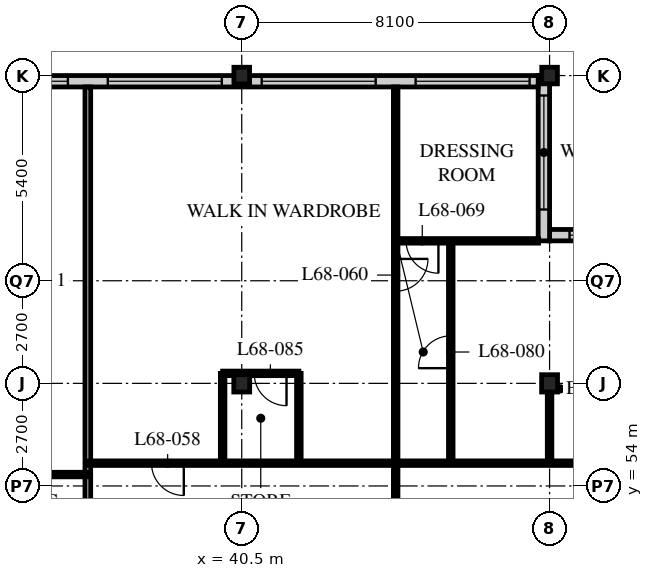
"""IFC4 building model, lengths in metres.
Left out: names, types, materials, properties, quantities, classifications, styles, units other than length and angle.
Written with IfcOpenShell. Run it as: python <this file> out.ifc"""

import sys

from ifc_helpers import new_model, si_unit, direction, frame, frame_2d, origin, origin_2d, place, context, subcontext, project, spatial, rectangle, i_section, extrude, element, fill, save


model = new_model("IFC4")
c1 = context("Model", 3, precision=1e-05, world=origin(), true_north=direction((0.0, 1.0)))
c2 = subcontext(c1, "Body", "Model", "MODEL_VIEW")
j1 = project(units=[si_unit("LENGTHUNIT", "METRE"), si_unit("PLANEANGLEUNIT", "RADIAN")], contexts=[c1])
p1 = place(None, origin())
s1 = spatial("IfcSite", under=j1, at=p1, CompositionType="ELEMENT")
p2 = place(p1, origin())
s2 = spatial("IfcBuilding", under=s1, at=p2, CompositionType="ELEMENT")
p3 = place(p2, frame((0.0, 0.0, 265.8)))
s3 = spatial("IfcBuildingStorey", under=s2, at=p3, CompositionType="ELEMENT", Elevation=265.8)
p4 = place(p3, frame((40.5, 56.7, 0.0), z_axis=(0.0, 0.0, 1.0), x_axis=(1.0, 0.0, 0.0)))
e1 = element("IfcColumn", 1, at=p4, inside=s3, PredefinedType="COLUMN", context=c2, shape_type="SweptSolid", body=[
    extrude(i_section(OverallWidth=0.418, OverallDepth=0.456, WebThickness=0.042, FlangeThickness=0.067, FilletRadius=0.015, at=origin_2d()), origin(), (0.0, 0.0, 1.0), 3.9),
])
p5 = place(p3, frame((40.5, 64.8, 0.0), z_axis=(0.0, 0.0, 1.0), x_axis=(1.0, 0.0, 0.0)))
e2 = element("IfcColumn", 2, at=p5, inside=s3, PredefinedType="COLUMN", context=c2, shape_type="SweptSolid", body=[
    extrude(i_section(OverallWidth=0.412, OverallDepth=0.437, WebThickness=0.036, FlangeThickness=0.058, FilletRadius=0.015, at=origin_2d()), origin(), (0.0, 0.0, 1.0), 3.9),
])
p6 = place(p3, frame((48.6, 56.7, 0.0), z_axis=(0.0, 0.0, 1.0), x_axis=(1.0, 0.0, 0.0)))
e3 = element("IfcColumn", 3, at=p6, inside=s3, PredefinedType="COLUMN", context=c2, shape_type="SweptSolid", body=[
    extrude(i_section(OverallWidth=0.418, OverallDepth=0.456, WebThickness=0.042, FlangeThickness=0.067, FilletRadius=0.015, at=origin_2d()), origin(), (0.0, 0.0, 1.0), 3.9),
])
p7 = place(p3, frame((48.6, 64.8, 0.0), z_axis=(0.0, 0.0, 1.0), x_axis=(1.0, 0.0, 0.0)))
e4 = element("IfcColumn", 4, at=p7, inside=s3, PredefinedType="COLUMN", context=c2, shape_type="SweptSolid", body=[
    extrude(i_section(OverallWidth=0.412, OverallDepth=0.437, WebThickness=0.036, FlangeThickness=0.058, FilletRadius=0.015, at=origin_2d()), origin(), (0.0, 0.0, 1.0), 3.9),
])
p8 = place(p3, frame((52.35, 60.6, 0.0), z_axis=(0.0, 0.0, 1.0), x_axis=(-1.0, 0.0, 0.0)))
e5 = element("IfcWall", 5, at=p8, inside=s3, PredefinedType="SOLIDWALL", context=c2, shape_type="SweptSolid", body=[
    extrude(rectangle(XDim=3.75, YDim=0.3, at=frame_2d((1.875, 0.0))), origin(), (0.0, 0.0, 1.0), 3.69),
])
p9 = place(p8, frame((0.225, 0.0, 0.6)))
e6 = element("IfcOpeningElement", 6, at=p9, cuts=e5, PredefinedType="OPENING", context=c2, shape_type="SweptSolid", body=[
    extrude(rectangle(XDim=3.0, YDim=2.3, at=frame_2d((1.5, 1.15))), frame((0.0, 0.16, 0.0), z_axis=(0.0, -1.0, 0.0), x_axis=(1.0, 0.0, 0.0)), (0.0, 0.0, 1.0), 0.32),
])
p10 = place(p3, frame((48.45, 60.45, 0.0), z_axis=(0.0, 0.0, 1.0), x_axis=(0.0, 1.0, 0.0)))
e7 = element("IfcWall", 7, at=p10, inside=s3, PredefinedType="SOLIDWALL", context=c2, shape_type="SweptSolid", body=[
    extrude(rectangle(XDim=4.35, YDim=0.3, at=frame_2d((2.175, 0.0))), origin(), (0.0, 0.0, 1.0), 3.69),
])
p11 = place(p10, frame((0.825, 0.0, 0.6)))
e8 = element("IfcOpeningElement", 8, at=p11, cuts=e7, PredefinedType="OPENING", context=c2, shape_type="SweptSolid", body=[
    extrude(rectangle(XDim=3.0, YDim=2.3, at=frame_2d((1.5, 1.15))), frame((0.0, 0.16, 0.0), z_axis=(0.0, -1.0, 0.0), x_axis=(1.0, 0.0, 0.0)), (0.0, 0.0, 1.0), 0.32),
])
p12 = place(p3, frame((48.3, 64.65, 0.0), z_axis=(0.0, 0.0, 1.0), x_axis=(-1.0, 0.0, 0.0)))
e9 = element("IfcWall", 9, at=p12, inside=s3, PredefinedType="SOLIDWALL", context=c2, shape_type="SweptSolid", body=[
    extrude(rectangle(XDim=40.2, YDim=0.3, at=frame_2d((20.1, 0.0))), origin(), (0.0, 0.0, 1.0), 3.69),
])
p13 = place(p12, frame((0.225, 0.0, 0.6)))
e10 = element("IfcOpeningElement", 10, at=p13, cuts=e9, PredefinedType="OPENING", context=c2, shape_type="SweptSolid", body=[
    extrude(rectangle(XDim=3.0, YDim=2.4, at=frame_2d((1.5, 1.2))), frame((0.0, 0.16, 0.0), z_axis=(0.0, -1.0, 0.0), x_axis=(1.0, 0.0, 0.0)), (0.0, 0.0, 1.0), 0.32),
])
p14 = place(p12, frame((4.275, 0.0, 0.6)))
e11 = element("IfcOpeningElement", 11, at=p14, cuts=e9, PredefinedType="OPENING", context=c2, shape_type="SweptSolid", body=[
    extrude(rectangle(XDim=3.0, YDim=2.4, at=frame_2d((1.5, 1.2))), frame((0.0, 0.16, 0.0), z_axis=(0.0, -1.0, 0.0), x_axis=(1.0, 0.0, 0.0)), (0.0, 0.0, 1.0), 0.32),
])
p15 = place(p12, frame((8.325, 0.0, 0.6)))
e12 = element("IfcOpeningElement", 12, at=p15, cuts=e9, PredefinedType="OPENING", context=c2, shape_type="SweptSolid", body=[
    extrude(rectangle(XDim=3.0, YDim=2.4, at=frame_2d((1.5, 1.2))), frame((0.0, 0.16, 0.0), z_axis=(0.0, -1.0, 0.0), x_axis=(1.0, 0.0, 0.0)), (0.0, 0.0, 1.0), 0.32),
])
p16 = place(p12, frame((12.375, 0.0, 0.6)))
e13 = element("IfcOpeningElement", 13, at=p16, cuts=e9, PredefinedType="OPENING", context=c2, shape_type="SweptSolid", body=[
    extrude(rectangle(XDim=3.0, YDim=2.4, at=frame_2d((1.5, 1.2))), frame((0.0, 0.16, 0.0), z_axis=(0.0, -1.0, 0.0), x_axis=(1.0, 0.0, 0.0)), (0.0, 0.0, 1.0), 0.32),
])
p17 = place(p12, frame((16.425, 0.0, 0.6)))
e14 = element("IfcOpeningElement", 14, at=p17, cuts=e9, PredefinedType="OPENING", context=c2, shape_type="SweptSolid", body=[
    extrude(rectangle(XDim=3.0, YDim=2.4, at=frame_2d((1.5, 1.2))), frame((0.0, 0.16, 0.0), z_axis=(0.0, -1.0, 0.0), x_axis=(1.0, 0.0, 0.0)), (0.0, 0.0, 1.0), 0.32),
])
p18 = place(p12, frame((20.475, 0.0, 0.6)))
e15 = element("IfcOpeningElement", 15, at=p18, cuts=e9, PredefinedType="OPENING", context=c2, shape_type="SweptSolid", body=[
    extrude(rectangle(XDim=3.0, YDim=2.4, at=frame_2d((1.5, 1.2))), frame((0.0, 0.16, 0.0), z_axis=(0.0, -1.0, 0.0), x_axis=(1.0, 0.0, 0.0)), (0.0, 0.0, 1.0), 0.32),
])
p19 = place(p12, frame((24.525, 0.0, 0.6)))
e16 = element("IfcOpeningElement", 16, at=p19, cuts=e9, PredefinedType="OPENING", context=c2, shape_type="SweptSolid", body=[
    extrude(rectangle(XDim=3.0, YDim=2.4, at=frame_2d((1.5, 1.2))), frame((0.0, 0.16, 0.0), z_axis=(0.0, -1.0, 0.0), x_axis=(1.0, 0.0, 0.0)), (0.0, 0.0, 1.0), 0.32),
])
p20 = place(p12, frame((28.575, 0.0, 0.6)))
e17 = element("IfcOpeningElement", 17, at=p20, cuts=e9, PredefinedType="OPENING", context=c2, shape_type="SweptSolid", body=[
    extrude(rectangle(XDim=3.0, YDim=2.4, at=frame_2d((1.5, 1.2))), frame((0.0, 0.16, 0.0), z_axis=(0.0, -1.0, 0.0), x_axis=(1.0, 0.0, 0.0)), (0.0, 0.0, 1.0), 0.32),
])
p21 = place(p12, frame((32.625, 0.0, 0.6)))
e18 = element("IfcOpeningElement", 18, at=p21, cuts=e9, PredefinedType="OPENING", context=c2, shape_type="SweptSolid", body=[
    extrude(rectangle(XDim=3.0, YDim=2.4, at=frame_2d((1.5, 1.2))), frame((0.0, 0.16, 0.0), z_axis=(0.0, -1.0, 0.0), x_axis=(1.0, 0.0, 0.0)), (0.0, 0.0, 1.0), 0.32),
])
p22 = place(p12, frame((36.675, 0.0, 0.6)))
e19 = element("IfcOpeningElement", 19, at=p22, cuts=e9, PredefinedType="OPENING", context=c2, shape_type="SweptSolid", body=[
    extrude(rectangle(XDim=3.0, YDim=2.4, at=frame_2d((1.5, 1.2))), frame((0.0, 0.16, 0.0), z_axis=(0.0, -1.0, 0.0), x_axis=(1.0, 0.0, 0.0)), (0.0, 0.0, 1.0), 0.32),
])
p23 = place(p3, frame((36.45, 64.5, 0.0), z_axis=(0.0, 0.0, 1.0), x_axis=(0.0, -1.0, 0.0)))
e20 = element("IfcWall", 20, at=p23, inside=s3, PredefinedType="PARTITIONING", context=c2, shape_type="SweptSolid", body=[
    extrude(rectangle(XDim=15.9, YDim=0.15, at=frame_2d((7.95, 0.0))), origin(), (0.0, 0.0, 1.0), 3.69),
])
p24 = place(p3, frame((36.45, 54.6, 0.0), z_axis=(0.0, 0.0, 1.0), x_axis=(1.0, 0.0, 0.0)))
e21 = element("IfcWall", 21, at=p24, inside=s3, PredefinedType="PARTITIONING", context=c2, shape_type="SweptSolid", body=[
    extrude(rectangle(XDim=19.95, YDim=0.12, at=frame_2d((9.975, 0.0))), origin(), (0.0, 0.0, 1.0), 3.69),
])
p25 = place(p24, frame((1.675, 0.0, 0.0)))
e22 = element("IfcOpeningElement", 22, at=p25, cuts=e21, PredefinedType="OPENING", context=c2, shape_type="SweptSolid", body=[
    extrude(rectangle(XDim=0.85, YDim=2.1, at=frame_2d((0.425, 1.05))), frame((0.0, 0.07, 0.0), z_axis=(0.0, -1.0, 0.0), x_axis=(1.0, 0.0, 0.0)), (0.0, 0.0, 1.0), 0.14),
])
p26 = place(p3, frame((44.55, 64.5, 0.0), z_axis=(0.0, 0.0, 1.0), x_axis=(0.0, -1.0, 0.0)))
e23 = element("IfcWall", 23, at=p26, inside=s3, PredefinedType="PARTITIONING", context=c2, shape_type="SweptSolid", body=[
    extrude(rectangle(XDim=17.7, YDim=0.12, at=frame_2d((8.85, 0.0))), origin(), (0.0, 0.0, 1.0), 3.69),
])
p27 = place(p26, frame((12.475, 0.0, 0.0)))
e24 = element("IfcOpeningElement", 24, at=p27, cuts=e23, PredefinedType="OPENING", context=c2, shape_type="SweptSolid", body=[
    extrude(rectangle(XDim=0.85, YDim=2.1, at=frame_2d((0.425, 1.05))), frame((0.0, 0.07, 0.0), z_axis=(0.0, -1.0, 0.0), x_axis=(1.0, 0.0, 0.0)), (0.0, 0.0, 1.0), 0.14),
])
p28 = place(p26, frame((4.525, 0.0, 0.0)))
e25 = element("IfcOpeningElement", 25, at=p28, cuts=e23, PredefinedType="OPENING", context=c2, shape_type="SweptSolid", body=[
    extrude(rectangle(XDim=0.85, YDim=2.1, at=frame_2d((0.425, 1.05))), frame((0.0, 0.07, 0.0), z_axis=(0.0, -1.0, 0.0), x_axis=(1.0, 0.0, 0.0)), (0.0, 0.0, 1.0), 0.14),
])
p29 = place(p3, frame((48.31, 60.45, 0.0), z_axis=(0.0, 0.0, 1.0), x_axis=(-1.0, 0.0, 0.0)))
e26 = element("IfcWall", 26, at=p29, inside=s3, PredefinedType="PARTITIONING", context=c2, shape_type="SweptSolid", body=[
    extrude(rectangle(XDim=3.76, YDim=0.12, at=frame_2d((1.88, 0.0))), origin(), (0.0, 0.0, 1.0), 3.69),
])
p30 = place(p29, frame((2.635, 0.0, 0.0)))
e27 = element("IfcOpeningElement", 27, at=p30, cuts=e26, PredefinedType="OPENING", context=c2, shape_type="SweptSolid", body=[
    extrude(rectangle(XDim=0.85, YDim=2.1, at=frame_2d((0.425, 1.05))), frame((0.0, 0.07, 0.0), z_axis=(0.0, -1.0, 0.0), x_axis=(1.0, 0.0, 0.0)), (0.0, 0.0, 1.0), 0.14),
])
p31 = place(p3, frame((32.4, 54.3, 0.0), z_axis=(0.0, 0.0, 1.0), x_axis=(1.0, 0.0, 0.0)))
e28 = element("IfcWall", 28, at=p31, inside=s3, PredefinedType="PARTITIONING", context=c2, shape_type="SweptSolid", body=[
    extrude(rectangle(XDim=4.05, YDim=0.12, at=frame_2d((2.025, 0.0))), origin(), (0.0, 0.0, 1.0), 3.69),
])
p32 = place(p31, frame((1.6, 0.0, 0.0)))
e29 = element("IfcOpeningElement", 29, at=p32, cuts=e28, PredefinedType="OPENING", context=c2, shape_type="SweptSolid", body=[
    extrude(rectangle(XDim=0.85, YDim=2.1, at=frame_2d((0.425, 1.05))), frame((0.0, 0.07, 0.0), z_axis=(0.0, -1.0, 0.0), x_axis=(1.0, 0.0, 0.0)), (0.0, 0.0, 1.0), 0.14),
])
p33 = place(p3, frame((46.0, 54.6, 0.0), z_axis=(0.0, 0.0, 1.0), x_axis=(0.0, 1.0, 0.0)))
e30 = element("IfcWall", 30, at=p33, inside=s3, PredefinedType="PARTITIONING", context=c2, shape_type="SweptSolid", body=[
    extrude(rectangle(XDim=5.85, YDim=0.12, at=frame_2d((2.925, 0.0))), origin(), (0.0, 0.0, 1.0), 3.69),
])
p34 = place(p33, frame((2.5, 0.0, 0.0)))
e31 = element("IfcOpeningElement", 31, at=p34, cuts=e30, PredefinedType="OPENING", context=c2, shape_type="SweptSolid", body=[
    extrude(rectangle(XDim=0.85, YDim=2.1, at=frame_2d((0.425, 1.05))), frame((0.0, 0.07, 0.0), z_axis=(0.0, -1.0, 0.0), x_axis=(1.0, 0.0, 0.0)), (0.0, 0.0, 1.0), 0.14),
])
for number, where, z_axis, x_axis in (
    (32, (39.997, 54.6, 0.0), (0.0, 0.0, 1.0), (0.0, 1.0, 0.0)),
    (33, (42.003, 54.6, 0.0), (0.0, 0.0, 1.0), (0.0, 1.0, 0.0)),
):
    element("IfcWall", number, at=place(p3, frame(where, z_axis=z_axis, x_axis=x_axis)), inside=s3, PredefinedType="PARTITIONING", context=c2, shape_type="SweptSolid", body=[
        extrude(rectangle(XDim=2.363, YDim=0.12, at=frame_2d((1.181, 0.0))), origin(), (0.0, 0.0, 1.0), 3.69),
    ])
p35 = place(p3, frame((39.997, 56.963, 0.0), z_axis=(0.0, 0.0, 1.0), x_axis=(1.0, 0.0, 0.0)))
e34 = element("IfcWall", 34, at=p35, inside=s3, PredefinedType="PARTITIONING", context=c2, shape_type="SweptSolid", body=[
    extrude(rectangle(XDim=2.006, YDim=0.12, at=frame_2d((1.003, 0.0))), origin(), (0.0, 0.0, 1.0), 3.69),
])
p36 = place(p35, frame((0.831, 0.0, 0.0)))
e35 = element("IfcOpeningElement", 35, at=p36, cuts=e34, PredefinedType="OPENING", context=c2, shape_type="SweptSolid", body=[
    extrude(rectangle(XDim=0.85, YDim=2.1, at=frame_2d((0.425, 1.05))), frame((0.0, 0.07, 0.0), z_axis=(0.0, -1.0, 0.0), x_axis=(1.0, 0.0, 0.0)), (0.0, 0.0, 1.0), 0.14),
])
p37 = place(p3, frame((48.6, 54.6, 0.0), z_axis=(0.0, 0.0, 1.0), x_axis=(0.0, 1.0, 0.0)))
e36 = element("IfcWall", 36, at=p37, inside=s3, PredefinedType="PARTITIONING", context=c2, shape_type="SweptSolid", body=[
    extrude(rectangle(XDim=1.897, YDim=0.12, at=frame_2d((0.948, 0.0))), origin(), (0.0, 0.0, 1.0), 3.078),
])
p38 = place(p9, origin())
e37 = element("IfcWindow", 37, at=p38, inside=s3, PartitioningType="SINGLE_PANEL", PredefinedType="WINDOW", context=c2, shape_type="SweptSolid", body=[
    extrude(rectangle(XDim=3.0, YDim=2.3, at=frame_2d((1.5, 1.15))), frame((0.0, 0.03, 0.0), z_axis=(0.0, -1.0, 0.0), x_axis=(1.0, 0.0, 0.0)), (0.0, 0.0, 1.0), 0.06),
])
fill(e6, e37)
p39 = place(p11, origin())
e38 = element("IfcWindow", 38, at=p39, inside=s3, PartitioningType="SINGLE_PANEL", PredefinedType="WINDOW", context=c2, shape_type="SweptSolid", body=[
    extrude(rectangle(XDim=3.0, YDim=2.3, at=frame_2d((1.5, 1.15))), frame((0.0, 0.03, 0.0), z_axis=(0.0, -1.0, 0.0), x_axis=(1.0, 0.0, 0.0)), (0.0, 0.0, 1.0), 0.06),
])
fill(e8, e38)
p40 = place(p13, origin())
e39 = element("IfcWindow", 39, at=p40, inside=s3, PartitioningType="SINGLE_PANEL", PredefinedType="WINDOW", context=c2, shape_type="SweptSolid", body=[
    extrude(rectangle(XDim=3.0, YDim=2.4, at=frame_2d((1.5, 1.2))), frame((0.0, 0.03, 0.0), z_axis=(0.0, -1.0, 0.0), x_axis=(1.0, 0.0, 0.0)), (0.0, 0.0, 1.0), 0.06),
])
fill(e10, e39)
p41 = place(p14, origin())
e40 = element("IfcWindow", 40, at=p41, inside=s3, PartitioningType="SINGLE_PANEL", PredefinedType="WINDOW", context=c2, shape_type="SweptSolid", body=[
    extrude(rectangle(XDim=3.0, YDim=2.4, at=frame_2d((1.5, 1.2))), frame((0.0, 0.03, 0.0), z_axis=(0.0, -1.0, 0.0), x_axis=(1.0, 0.0, 0.0)), (0.0, 0.0, 1.0), 0.06),
])
fill(e11, e40)
p42 = place(p15, origin())
e41 = element("IfcWindow", 41, at=p42, inside=s3, PartitioningType="SINGLE_PANEL", PredefinedType="WINDOW", context=c2, shape_type="SweptSolid", body=[
    extrude(rectangle(XDim=3.0, YDim=2.4, at=frame_2d((1.5, 1.2))), frame((0.0, 0.03, 0.0), z_axis=(0.0, -1.0, 0.0), x_axis=(1.0, 0.0, 0.0)), (0.0, 0.0, 1.0), 0.06),
])
fill(e12, e41)
p43 = place(p16, origin())
e42 = element("IfcWindow", 42, at=p43, inside=s3, PartitioningType="SINGLE_PANEL", PredefinedType="WINDOW", context=c2, shape_type="SweptSolid", body=[
    extrude(rectangle(XDim=3.0, YDim=2.4, at=frame_2d((1.5, 1.2))), frame((0.0, 0.03, 0.0), z_axis=(0.0, -1.0, 0.0), x_axis=(1.0, 0.0, 0.0)), (0.0, 0.0, 1.0), 0.06),
])
fill(e13, e42)
p44 = place(p25, origin())
e43 = element("IfcDoor", 43, at=p44, inside=s3, OperationType="SINGLE_SWING_LEFT", PredefinedType="DOOR", context=c2, shape_type="SweptSolid", body=[
    extrude(rectangle(XDim=0.85, YDim=2.1, at=frame_2d((0.425, 1.05))), frame((0.0, 0.025, 0.0), z_axis=(0.0, -1.0, 0.0), x_axis=(1.0, 0.0, 0.0)), (0.0, 0.0, 1.0), 0.05),
])
fill(e22, e43)
p45 = place(p28, origin())
e44 = element("IfcDoor", 44, at=p45, inside=s3, OperationType="SINGLE_SWING_LEFT", PredefinedType="DOOR", context=c2, shape_type="SweptSolid", body=[
    extrude(rectangle(XDim=0.85, YDim=2.1, at=frame_2d((0.425, 1.05))), frame((0.0, 0.025, 0.0), z_axis=(0.0, -1.0, 0.0), x_axis=(1.0, 0.0, 0.0)), (0.0, 0.0, 1.0), 0.05),
])
fill(e25, e44)
p46 = place(p30, origin())
e45 = element("IfcDoor", 45, at=p46, inside=s3, OperationType="SINGLE_SWING_LEFT", PredefinedType="DOOR", context=c2, shape_type="SweptSolid", body=[
    extrude(rectangle(XDim=0.85, YDim=2.1, at=frame_2d((0.425, 1.05))), frame((0.0, 0.025, 0.0), z_axis=(0.0, -1.0, 0.0), x_axis=(1.0, 0.0, 0.0)), (0.0, 0.0, 1.0), 0.05),
])
fill(e27, e45)
p47 = place(p34, origin())
e46 = element("IfcDoor", 46, at=p47, inside=s3, OperationType="SINGLE_SWING_LEFT", PredefinedType="DOOR", context=c2, shape_type="SweptSolid", body=[
    extrude(rectangle(XDim=0.85, YDim=2.1, at=frame_2d((0.425, 1.05))), frame((0.0, 0.025, 0.0), z_axis=(0.0, -1.0, 0.0), x_axis=(1.0, 0.0, 0.0)), (0.0, 0.0, 1.0), 0.05),
])
fill(e31, e46)
p48 = place(p36, origin())
e47 = element("IfcDoor", 47, at=p48, inside=s3, OperationType="SINGLE_SWING_LEFT", PredefinedType="DOOR", context=c2, shape_type="SweptSolid", body=[
    extrude(rectangle(XDim=0.85, YDim=2.1, at=frame_2d((0.425, 1.05))), frame((0.0, 0.025, 0.0), z_axis=(0.0, -1.0, 0.0), x_axis=(1.0, 0.0, 0.0)), (0.0, 0.0, 1.0), 0.05),
])
fill(e35, e47)
save(model, sys.argv[1])
